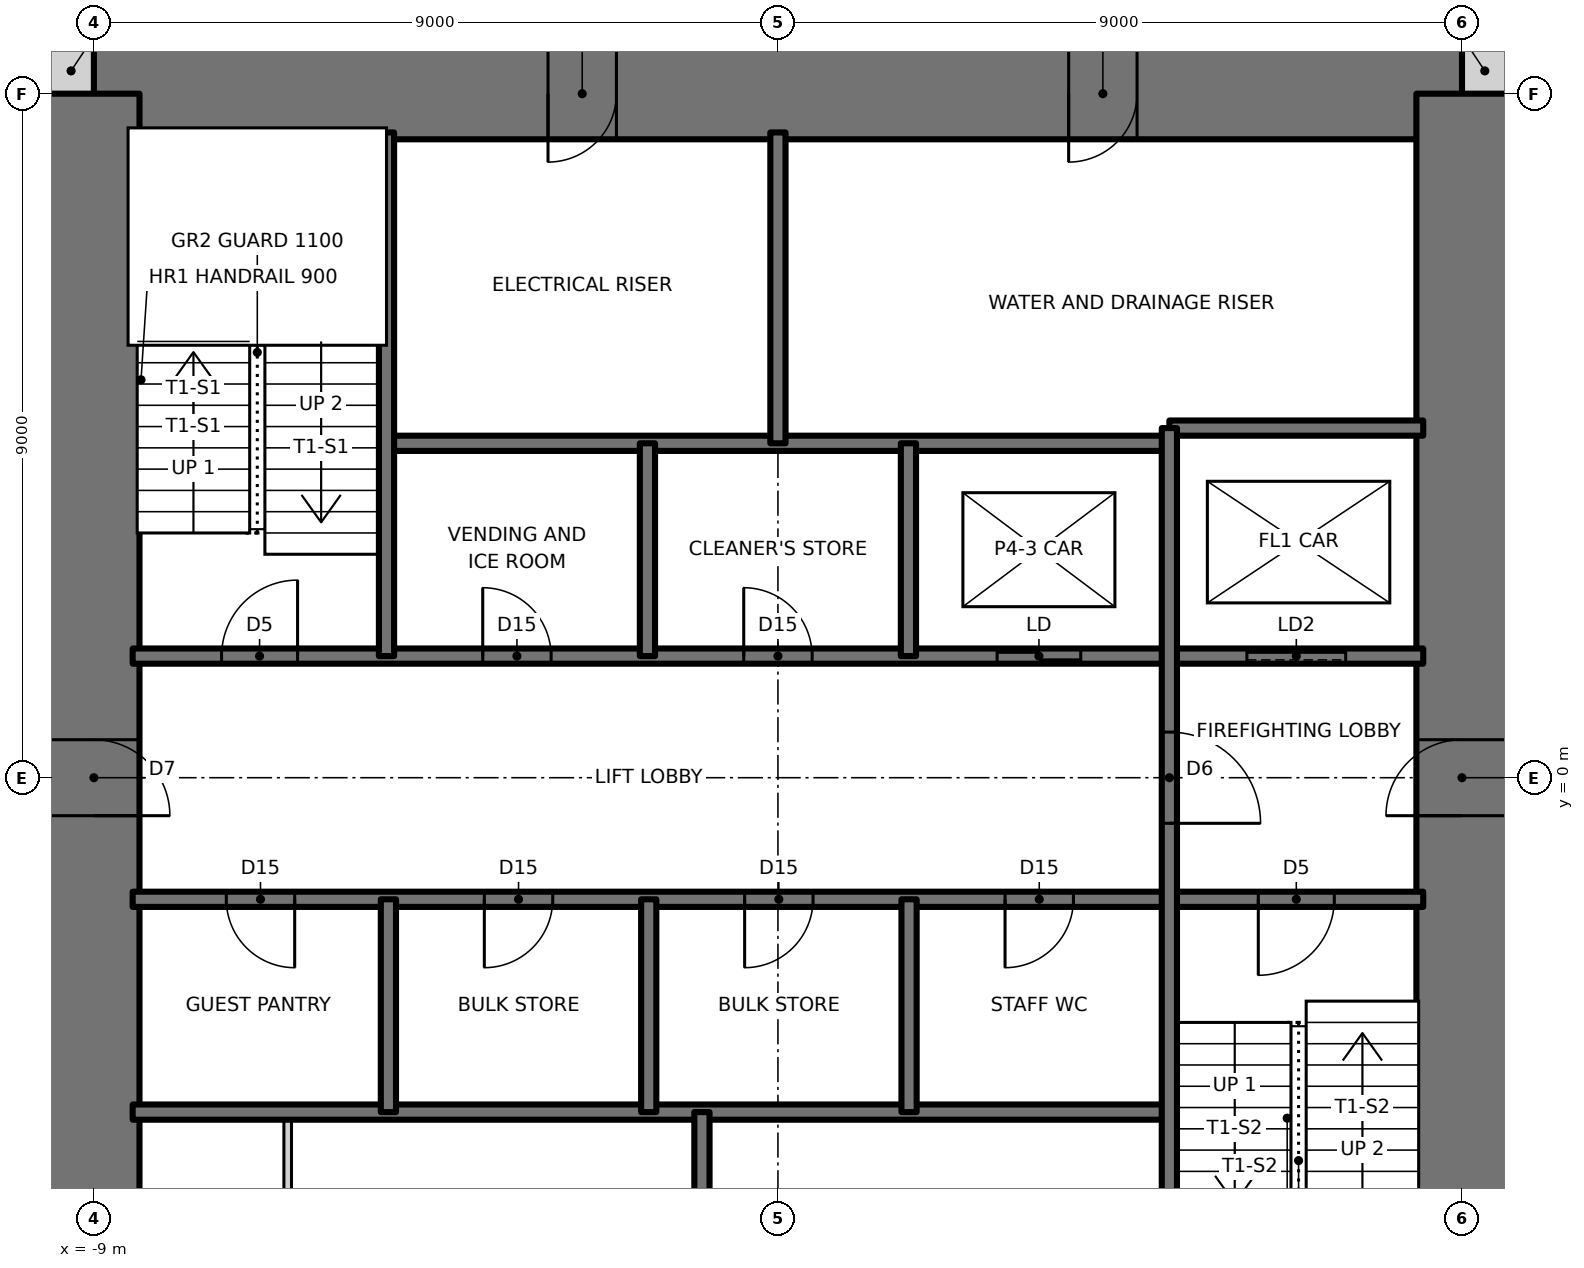
"""IFC4 building model, lengths in metres.
Left out: names, types, materials, properties, quantities, classifications, styles, units other than length and angle.
Written with IfcOpenShell. Run it as: python <this file> out.ifc"""

import sys

from ifc_helpers import new_model, si_unit, direction, frame, frame_2d, origin, place, context, subcontext, project, spatial, rectangle, extrude, element, fill, save


model = new_model("IFC4")
c1 = context("Model", 3, precision=1e-05, world=origin(), true_north=direction((0.0, 1.0)))
c2 = subcontext(c1, "Body", "Model", "MODEL_VIEW")
j1 = project(units=[si_unit("LENGTHUNIT", "METRE"), si_unit("PLANEANGLEUNIT", "RADIAN")], contexts=[c1])
p1 = place(None, origin())
s1 = spatial("IfcSite", under=j1, at=p1, CompositionType="ELEMENT")
p2 = place(p1, origin())
s2 = spatial("IfcBuilding", under=s1, at=p2, CompositionType="ELEMENT")
p3 = place(p2, frame((0.0, 0.0, 225.5)))
s3 = spatial("IfcBuildingStorey", under=s2, at=p3, CompositionType="ELEMENT", Elevation=225.5)
for number, where, z_axis, x_axis in (
    (1, (9.0, 9.3, 0.0), (0.0, 0.0, 1.0), (1.0, 0.0, 0.0)),
    (2, (-9.6, 9.3, 0.0), (0.0, 0.0, 1.0), (1.0, 0.0, 0.0)),
):
    element("IfcWall", number, at=place(p3, frame(where, z_axis=z_axis, x_axis=x_axis)), inside=s3, PredefinedType="SOLIDWALL", context=c2, shape_type="SweptSolid", body=[
        extrude(rectangle(XDim=0.6, YDim=0.6, at=frame_2d((0.3, 0.0))), origin(), (0.0, 0.0, 1.0), 3.5),
    ])
p4 = place(p3, frame((9.0, 9.0, 0.0), z_axis=(0.0, 0.0, 1.0), x_axis=(-1.0, 0.0, 0.0)))
e3 = element("IfcWall", 3, at=p4, inside=s3, PredefinedType="SHEAR", context=c2, shape_type="SweptSolid", body=[
    extrude(rectangle(XDim=18.0, YDim=1.2, at=frame_2d((9.0, 0.0))), origin(), (0.0, 0.0, 1.0), 3.5),
])
p5 = place(p4, frame((11.125, 0.0, 0.0)))
e4 = element("IfcOpeningElement", 4, at=p5, cuts=e3, PredefinedType="OPENING", context=c2, shape_type="SweptSolid", body=[
    extrude(rectangle(XDim=0.9, YDim=2.1, at=frame_2d((0.45, 1.05))), frame((0.0, 0.61, 0.0), z_axis=(0.0, -1.0, 0.0), x_axis=(1.0, 0.0, 0.0)), (0.0, 0.0, 1.0), 1.22),
])
p6 = place(p4, frame((4.275, 0.0, 0.0)))
e5 = element("IfcOpeningElement", 5, at=p6, cuts=e3, PredefinedType="OPENING", context=c2, shape_type="SweptSolid", body=[
    extrude(rectangle(XDim=0.9, YDim=2.1, at=frame_2d((0.45, 1.05))), frame((0.0, 0.61, 0.0), z_axis=(0.0, -1.0, 0.0), x_axis=(1.0, 0.0, 0.0)), (0.0, 0.0, 1.0), 1.22),
])
p7 = place(p3, frame((9.0, -9.0, 0.0), z_axis=(0.0, 0.0, 1.0), x_axis=(0.0, 1.0, 0.0)))
e6 = element("IfcWall", 6, at=p7, inside=s3, PredefinedType="SHEAR", context=c2, shape_type="SweptSolid", body=[
    extrude(rectangle(XDim=18.0, YDim=1.2, at=frame_2d((9.0, 0.0))), origin(), (0.0, 0.0, 1.0), 3.5),
])
p8 = place(p7, frame((8.5, 0.0, 0.0)))
e7 = element("IfcOpeningElement", 7, at=p8, cuts=e6, PredefinedType="OPENING", context=c2, shape_type="SweptSolid", body=[
    extrude(rectangle(XDim=1.0, YDim=2.1, at=frame_2d((0.5, 1.05))), frame((0.0, 0.61, 0.0), z_axis=(0.0, -1.0, 0.0), x_axis=(1.0, 0.0, 0.0)), (0.0, 0.0, 1.0), 1.22),
])
p9 = place(p3, frame((-9.0, 9.0, 0.0), z_axis=(0.0, 0.0, 1.0), x_axis=(0.0, -1.0, 0.0)))
e8 = element("IfcWall", 8, at=p9, inside=s3, PredefinedType="SHEAR", context=c2, shape_type="SweptSolid", body=[
    extrude(rectangle(XDim=18.0, YDim=1.2, at=frame_2d((9.0, 0.0))), origin(), (0.0, 0.0, 1.0), 3.5),
])
p10 = place(p9, frame((8.5, 0.0, 0.0)))
e9 = element("IfcOpeningElement", 9, at=p10, cuts=e8, PredefinedType="OPENING", context=c2, shape_type="SweptSolid", body=[
    extrude(rectangle(XDim=1.0, YDim=2.1, at=frame_2d((0.5, 1.05))), frame((0.0, 0.61, 0.0), z_axis=(0.0, -1.0, 0.0), x_axis=(1.0, 0.0, 0.0)), (0.0, 0.0, 1.0), 1.22),
])
p11 = place(p3, frame((-8.49, -4.4, 0.0), z_axis=(0.0, 0.0, 1.0), x_axis=(1.0, 0.0, 0.0)))
e10 = element("IfcWall", 10, at=p11, inside=s3, PredefinedType="SOLIDWALL", context=c2, shape_type="SweptSolid", body=[
    extrude(rectangle(XDim=13.64, YDim=0.2, at=frame_2d((6.82, 0.0))), origin(), (0.0, 0.0, 1.0), 3.5),
])
p12 = place(p3, frame((-8.49, -1.6, 0.0), z_axis=(0.0, 0.0, 1.0), x_axis=(1.0, 0.0, 0.0)))
e11 = element("IfcWall", 11, at=p12, inside=s3, PredefinedType="SOLIDWALL", context=c2, shape_type="SweptSolid", body=[
    extrude(rectangle(XDim=16.98, YDim=0.2, at=frame_2d((8.49, 0.0))), origin(), (0.0, 0.0, 1.0), 3.5),
])
p13 = place(p12, frame((14.81, 0.0, 0.0)))
e12 = element("IfcOpeningElement", 12, at=p13, cuts=e11, PredefinedType="OPENING", context=c2, shape_type="SweptSolid", body=[
    extrude(rectangle(XDim=1.0, YDim=2.1, at=frame_2d((0.5, 1.05))), frame((0.0, 0.11, 0.0), z_axis=(0.0, -1.0, 0.0), x_axis=(1.0, 0.0, 0.0)), (0.0, 0.0, 1.0), 0.22),
])
p14 = place(p12, frame((1.232, 0.0, 0.0)))
e13 = element("IfcOpeningElement", 13, at=p14, cuts=e11, PredefinedType="OPENING", context=c2, shape_type="SweptSolid", body=[
    extrude(rectangle(XDim=0.9, YDim=2.1, at=frame_2d((0.45, 1.05))), frame((0.0, 0.11, 0.0), z_axis=(0.0, -1.0, 0.0), x_axis=(1.0, 0.0, 0.0)), (0.0, 0.0, 1.0), 0.22),
])
p15 = place(p12, frame((4.627, 0.0, 0.0)))
e14 = element("IfcOpeningElement", 14, at=p15, cuts=e11, PredefinedType="OPENING", context=c2, shape_type="SweptSolid", body=[
    extrude(rectangle(XDim=0.9, YDim=2.1, at=frame_2d((0.45, 1.05))), frame((0.0, 0.11, 0.0), z_axis=(0.0, -1.0, 0.0), x_axis=(1.0, 0.0, 0.0)), (0.0, 0.0, 1.0), 0.22),
])
p16 = place(p12, frame((8.052, 0.0, 0.0)))
e15 = element("IfcOpeningElement", 15, at=p16, cuts=e11, PredefinedType="OPENING", context=c2, shape_type="SweptSolid", body=[
    extrude(rectangle(XDim=0.9, YDim=2.1, at=frame_2d((0.45, 1.05))), frame((0.0, 0.11, 0.0), z_axis=(0.0, -1.0, 0.0), x_axis=(1.0, 0.0, 0.0)), (0.0, 0.0, 1.0), 0.22),
])
p17 = place(p12, frame((11.478, 0.0, 0.0)))
e16 = element("IfcOpeningElement", 16, at=p17, cuts=e11, PredefinedType="OPENING", context=c2, shape_type="SweptSolid", body=[
    extrude(rectangle(XDim=0.9, YDim=2.1, at=frame_2d((0.45, 1.05))), frame((0.0, 0.11, 0.0), z_axis=(0.0, -1.0, 0.0), x_axis=(1.0, 0.0, 0.0)), (0.0, 0.0, 1.0), 0.22),
])
p18 = place(p3, frame((-8.49, 1.6, 0.0), z_axis=(0.0, 0.0, 1.0), x_axis=(1.0, 0.0, 0.0)))
e17 = element("IfcWall", 17, at=p18, inside=s3, PredefinedType="SOLIDWALL", context=c2, shape_type="SweptSolid", body=[
    extrude(rectangle(XDim=16.98, YDim=0.2, at=frame_2d((8.49, 0.0))), origin(), (0.0, 0.0, 1.0), 3.5),
])
p19 = place(p18, frame((1.17, 0.0, 0.0)))
e18 = element("IfcOpeningElement", 18, at=p19, cuts=e17, PredefinedType="OPENING", context=c2, shape_type="SweptSolid", body=[
    extrude(rectangle(XDim=1.0, YDim=2.1, at=frame_2d((0.5, 1.05))), frame((0.0, 0.11, 0.0), z_axis=(0.0, -1.0, 0.0), x_axis=(1.0, 0.0, 0.0)), (0.0, 0.0, 1.0), 0.22),
])
p20 = place(p18, frame((4.606, 0.0, 0.0)))
e19 = element("IfcOpeningElement", 19, at=p20, cuts=e17, PredefinedType="OPENING", context=c2, shape_type="SweptSolid", body=[
    extrude(rectangle(XDim=0.9, YDim=2.1, at=frame_2d((0.45, 1.05))), frame((0.0, 0.11, 0.0), z_axis=(0.0, -1.0, 0.0), x_axis=(1.0, 0.0, 0.0)), (0.0, 0.0, 1.0), 0.22),
])
p21 = place(p18, frame((8.04, 0.0, 0.0)))
e20 = element("IfcOpeningElement", 20, at=p21, cuts=e17, PredefinedType="OPENING", context=c2, shape_type="SweptSolid", body=[
    extrude(rectangle(XDim=0.9, YDim=2.1, at=frame_2d((0.45, 1.05))), frame((0.0, 0.11, 0.0), z_axis=(0.0, -1.0, 0.0), x_axis=(1.0, 0.0, 0.0)), (0.0, 0.0, 1.0), 0.22),
])
p22 = place(p18, frame((11.374, 0.0, 0.0)))
e21 = element("IfcOpeningElement", 21, at=p22, cuts=e17, PredefinedType="OPENING", context=c2, shape_type="SweptSolid", body=[
    extrude(rectangle(XDim=1.1, YDim=2.1, at=frame_2d((0.55, 1.05))), frame((0.0, 0.11, 0.0), z_axis=(0.0, -1.0, 0.0), x_axis=(1.0, 0.0, 0.0)), (0.0, 0.0, 1.0), 0.22),
])
p23 = place(p18, frame((14.66, 0.0, 0.0)))
e22 = element("IfcOpeningElement", 22, at=p23, cuts=e17, PredefinedType="OPENING", context=c2, shape_type="SweptSolid", body=[
    extrude(rectangle(XDim=1.3, YDim=2.1, at=frame_2d((0.65, 1.05))), frame((0.0, 0.11, 0.0), z_axis=(0.0, -1.0, 0.0), x_axis=(1.0, 0.0, 0.0)), (0.0, 0.0, 1.0), 0.22),
])
p24 = place(p3, frame((-5.15, 4.4, 0.0), z_axis=(0.0, 0.0, 1.0), x_axis=(1.0, 0.0, 0.0)))
e23 = element("IfcWall", 23, at=p24, inside=s3, PredefinedType="SOLIDWALL", context=c2, shape_type="SweptSolid", body=[
    extrude(rectangle(XDim=10.3, YDim=0.2, at=frame_2d((5.15, 0.0))), origin(), (0.0, 0.0, 1.0), 3.5),
])
p25 = place(p3, frame((5.15, 4.6, 0.0), z_axis=(0.0, 0.0, 1.0), x_axis=(1.0, 0.0, 0.0)))
e24 = element("IfcWall", 24, at=p25, inside=s3, PredefinedType="SOLIDWALL", context=c2, shape_type="SweptSolid", body=[
    extrude(rectangle(XDim=3.34, YDim=0.2, at=frame_2d((1.67, 0.0))), origin(), (0.0, 0.0, 1.0), 3.5),
])
p26 = place(p3, frame((5.15, -8.49, 0.0), z_axis=(0.0, 0.0, 1.0), x_axis=(0.0, 1.0, 0.0)))
e25 = element("IfcWall", 25, at=p26, inside=s3, PredefinedType="SOLIDWALL", context=c2, shape_type="SweptSolid", body=[
    extrude(rectangle(XDim=13.09, YDim=0.2, at=frame_2d((6.545, 0.0))), origin(), (0.0, 0.0, 1.0), 3.5),
])
p27 = place(p26, frame((7.89, 0.0, 0.0)))
e26 = element("IfcOpeningElement", 26, at=p27, cuts=e25, PredefinedType="OPENING", context=c2, shape_type="SweptSolid", body=[
    extrude(rectangle(XDim=1.2, YDim=2.1, at=frame_2d((0.6, 1.05))), frame((0.0, 0.11, 0.0), z_axis=(0.0, -1.0, 0.0), x_axis=(1.0, 0.0, 0.0)), (0.0, 0.0, 1.0), 0.22),
])
for number, where, z_axis, x_axis in (
    (27, (1.725, -4.4, 0.0), (0.0, 0.0, 1.0), (0.0, 1.0, 0.0)),
    (28, (1.717, 1.6, 0.0), (0.0, 0.0, 1.0), (0.0, 1.0, 0.0)),
):
    element("IfcWall", number, at=place(p3, frame(where, z_axis=z_axis, x_axis=x_axis)), inside=s3, PredefinedType="SOLIDWALL", context=c2, shape_type="SweptSolid", body=[
        extrude(rectangle(XDim=2.8, YDim=0.2, at=frame_2d((1.4, 0.0))), origin(), (0.0, 0.0, 1.0), 3.5),
    ])
for number, where, z_axis, x_axis in (
    (29, (0.0, 4.4, 0.0), (0.0, 0.0, 1.0), (0.0, 1.0, 0.0)),
    (30, (-1.0, -8.49, 0.0), (0.0, 0.0, 1.0), (0.0, 1.0, 0.0)),
):
    element("IfcWall", number, at=place(p3, frame(where, z_axis=z_axis, x_axis=x_axis)), inside=s3, PredefinedType="SOLIDWALL", context=c2, shape_type="SweptSolid", body=[
        extrude(rectangle(XDim=4.09, YDim=0.2, at=frame_2d((2.045, 0.0))), origin(), (0.0, 0.0, 1.0), 3.5),
    ])
for number, where, z_axis, x_axis in (
    (31, (-1.7, -4.4, 0.0), (0.0, 0.0, 1.0), (0.0, 1.0, 0.0)),
    (32, (-1.717, 1.6, 0.0), (0.0, 0.0, 1.0), (0.0, 1.0, 0.0)),
    (33, (-5.125, -4.4, 0.0), (0.0, 0.0, 1.0), (0.0, 1.0, 0.0)),
):
    element("IfcWall", number, at=place(p3, frame(where, z_axis=z_axis, x_axis=x_axis)), inside=s3, PredefinedType="SOLIDWALL", context=c2, shape_type="SweptSolid", body=[
        extrude(rectangle(XDim=2.8, YDim=0.2, at=frame_2d((1.4, 0.0))), origin(), (0.0, 0.0, 1.0), 3.5),
    ])
p28 = place(p3, frame((-5.15, 1.6, 0.0), z_axis=(0.0, 0.0, 1.0), x_axis=(0.0, 1.0, 0.0)))
e34 = element("IfcWall", 34, at=p28, inside=s3, PredefinedType="SOLIDWALL", context=c2, shape_type="SweptSolid", body=[
    extrude(rectangle(XDim=6.89, YDim=0.2, at=frame_2d((3.445, 0.0))), origin(), (0.0, 0.0, 1.0), 3.5),
])
p29 = place(p3, frame((-6.45, -8.49, 0.0), z_axis=(0.0, 0.0, 1.0), x_axis=(0.0, 1.0, 0.0)))
e35 = element("IfcWall", 35, at=p29, inside=s3, PredefinedType="PARTITIONING", context=c2, shape_type="SweptSolid", body=[
    extrude(rectangle(XDim=4.09, YDim=0.1, at=frame_2d((2.045, 0.0))), origin(), (0.0, 0.0, 1.0), 3.3),
])
p30 = place(p29, frame((1.595, 0.0, 0.0)))
e36 = element("IfcOpeningElement", 36, at=p30, cuts=e35, PredefinedType="OPENING", context=c2, shape_type="SweptSolid", body=[
    extrude(rectangle(XDim=0.9, YDim=2.1, at=frame_2d((0.45, 1.05))), frame((0.0, 0.06, 0.0), z_axis=(0.0, -1.0, 0.0), x_axis=(1.0, 0.0, 0.0)), (0.0, 0.0, 1.0), 0.12),
])
p31 = place(p19, origin())
e37 = element("IfcDoor", 37, at=p31, inside=s3, OperationType="SINGLE_SWING_RIGHT", PredefinedType="DOOR", context=c2, shape_type="SweptSolid", body=[
    extrude(rectangle(XDim=1.0, YDim=2.1, at=frame_2d((0.5, 1.05))), frame((0.0, 0.025, 0.0), z_axis=(0.0, -1.0, 0.0), x_axis=(1.0, 0.0, 0.0)), (0.0, 0.0, 1.0), 0.05),
])
fill(e18, e37)
p32 = place(p13, frame((1.0, 0.0, 0.0), z_axis=(0.0, 0.0, 1.0), x_axis=(-1.0, 0.0, 0.0)))
e38 = element("IfcDoor", 38, at=p32, inside=s3, OperationType="SINGLE_SWING_RIGHT", PredefinedType="DOOR", context=c2, shape_type="SweptSolid", body=[
    extrude(rectangle(XDim=1.0, YDim=2.1, at=frame_2d((0.5, 1.05))), frame((0.0, 0.025, 0.0), z_axis=(0.0, -1.0, 0.0), x_axis=(1.0, 0.0, 0.0)), (0.0, 0.0, 1.0), 0.05),
])
fill(e12, e38)
p33 = place(p27, frame((1.2, 0.0, 0.0), z_axis=(0.0, 0.0, 1.0), x_axis=(-1.0, 0.0, 0.0)))
e39 = element("IfcDoor", 39, at=p33, inside=s3, OperationType="SINGLE_SWING_RIGHT", PredefinedType="DOOR", context=c2, shape_type="SweptSolid", body=[
    extrude(rectangle(XDim=1.2, YDim=2.1, at=frame_2d((0.6, 1.05))), frame((0.0, 0.025, 0.0), z_axis=(0.0, -1.0, 0.0), x_axis=(1.0, 0.0, 0.0)), (0.0, 0.0, 1.0), 0.05),
])
fill(e26, e39)
p34 = place(p20, origin())
e40 = element("IfcDoor", 40, at=p34, inside=s3, OperationType="SINGLE_SWING_LEFT", PredefinedType="DOOR", context=c2, shape_type="SweptSolid", body=[
    extrude(rectangle(XDim=0.9, YDim=2.1, at=frame_2d((0.45, 1.05))), frame((0.0, 0.025, 0.0), z_axis=(0.0, -1.0, 0.0), x_axis=(1.0, 0.0, 0.0)), (0.0, 0.0, 1.0), 0.05),
])
fill(e19, e40)
p35 = place(p21, origin())
e41 = element("IfcDoor", 41, at=p35, inside=s3, OperationType="SINGLE_SWING_LEFT", PredefinedType="DOOR", context=c2, shape_type="SweptSolid", body=[
    extrude(rectangle(XDim=0.9, YDim=2.1, at=frame_2d((0.45, 1.05))), frame((0.0, 0.025, 0.0), z_axis=(0.0, -1.0, 0.0), x_axis=(1.0, 0.0, 0.0)), (0.0, 0.0, 1.0), 0.05),
])
fill(e20, e41)
p36 = place(p14, frame((0.9, 0.0, 0.0), z_axis=(0.0, 0.0, 1.0), x_axis=(-1.0, 0.0, 0.0)))
e42 = element("IfcDoor", 42, at=p36, inside=s3, OperationType="SINGLE_SWING_LEFT", PredefinedType="DOOR", context=c2, shape_type="SweptSolid", body=[
    extrude(rectangle(XDim=0.9, YDim=2.1, at=frame_2d((0.45, 1.05))), frame((0.0, 0.025, 0.0), z_axis=(0.0, -1.0, 0.0), x_axis=(1.0, 0.0, 0.0)), (0.0, 0.0, 1.0), 0.05),
])
fill(e13, e42)
p37 = place(p15, frame((0.9, 0.0, 0.0), z_axis=(0.0, 0.0, 1.0), x_axis=(-1.0, 0.0, 0.0)))
e43 = element("IfcDoor", 43, at=p37, inside=s3, OperationType="SINGLE_SWING_RIGHT", PredefinedType="DOOR", context=c2, shape_type="SweptSolid", body=[
    extrude(rectangle(XDim=0.9, YDim=2.1, at=frame_2d((0.45, 1.05))), frame((0.0, 0.025, 0.0), z_axis=(0.0, -1.0, 0.0), x_axis=(1.0, 0.0, 0.0)), (0.0, 0.0, 1.0), 0.05),
])
fill(e14, e43)
p38 = place(p16, frame((0.9, 0.0, 0.0), z_axis=(0.0, 0.0, 1.0), x_axis=(-1.0, 0.0, 0.0)))
e44 = element("IfcDoor", 44, at=p38, inside=s3, OperationType="SINGLE_SWING_RIGHT", PredefinedType="DOOR", context=c2, shape_type="SweptSolid", body=[
    extrude(rectangle(XDim=0.9, YDim=2.1, at=frame_2d((0.45, 1.05))), frame((0.0, 0.025, 0.0), z_axis=(0.0, -1.0, 0.0), x_axis=(1.0, 0.0, 0.0)), (0.0, 0.0, 1.0), 0.05),
])
fill(e15, e44)
p39 = place(p17, frame((0.9, 0.0, 0.0), z_axis=(0.0, 0.0, 1.0), x_axis=(-1.0, 0.0, 0.0)))
e45 = element("IfcDoor", 45, at=p39, inside=s3, OperationType="SINGLE_SWING_RIGHT", PredefinedType="DOOR", context=c2, shape_type="SweptSolid", body=[
    extrude(rectangle(XDim=0.9, YDim=2.1, at=frame_2d((0.45, 1.05))), frame((0.0, 0.025, 0.0), z_axis=(0.0, -1.0, 0.0), x_axis=(1.0, 0.0, 0.0)), (0.0, 0.0, 1.0), 0.05),
])
fill(e16, e45)
p40 = place(p10, origin())
e46 = element("IfcDoor", 46, at=p40, inside=s3, OperationType="SINGLE_SWING_RIGHT", PredefinedType="DOOR", context=c2, shape_type="SweptSolid", body=[
    extrude(rectangle(XDim=1.0, YDim=2.1, at=frame_2d((0.5, 1.05))), frame((0.0, 0.025, 0.0), z_axis=(0.0, -1.0, 0.0), x_axis=(1.0, 0.0, 0.0)), (0.0, 0.0, 1.0), 0.05),
])
fill(e9, e46)
p41 = place(p8, origin())
e47 = element("IfcDoor", 47, at=p41, inside=s3, OperationType="SINGLE_SWING_LEFT", PredefinedType="DOOR", context=c2, shape_type="SweptSolid", body=[
    extrude(rectangle(XDim=1.0, YDim=2.1, at=frame_2d((0.5, 1.05))), frame((0.0, 0.025, 0.0), z_axis=(0.0, -1.0, 0.0), x_axis=(1.0, 0.0, 0.0)), (0.0, 0.0, 1.0), 0.05),
])
fill(e7, e47)
p42 = place(p5, origin())
e48 = element("IfcDoor", 48, at=p42, inside=s3, OperationType="SINGLE_SWING_RIGHT", PredefinedType="DOOR", context=c2, shape_type="SweptSolid", body=[
    extrude(rectangle(XDim=0.9, YDim=2.1, at=frame_2d((0.45, 1.05))), frame((0.0, 0.025, 0.0), z_axis=(0.0, -1.0, 0.0), x_axis=(1.0, 0.0, 0.0)), (0.0, 0.0, 1.0), 0.05),
])
fill(e4, e48)
p43 = place(p6, origin())
e49 = element("IfcDoor", 49, at=p43, inside=s3, OperationType="SINGLE_SWING_RIGHT", PredefinedType="DOOR", context=c2, shape_type="SweptSolid", body=[
    extrude(rectangle(XDim=0.9, YDim=2.1, at=frame_2d((0.45, 1.05))), frame((0.0, 0.025, 0.0), z_axis=(0.0, -1.0, 0.0), x_axis=(1.0, 0.0, 0.0)), (0.0, 0.0, 1.0), 0.05),
])
fill(e5, e49)
p44 = place(p22, origin())
e50 = element("IfcDoor", 50, at=p44, inside=s3, OperationType="DOUBLE_DOOR_SLIDING", PredefinedType="DOOR", context=c2, shape_type="SweptSolid", body=[
    extrude(rectangle(XDim=1.1, YDim=2.1, at=frame_2d((0.55, 1.05))), frame((0.0, 0.025, 0.0), z_axis=(0.0, -1.0, 0.0), x_axis=(1.0, 0.0, 0.0)), (0.0, 0.0, 1.0), 0.05),
])
fill(e21, e50)
p45 = place(p23, origin())
e51 = element("IfcDoor", 51, at=p45, inside=s3, OperationType="SLIDING_TO_LEFT", PredefinedType="DOOR", context=c2, shape_type="SweptSolid", body=[
    extrude(rectangle(XDim=1.3, YDim=2.1, at=frame_2d((0.65, 1.05))), frame((0.0, 0.025, 0.0), z_axis=(0.0, -1.0, 0.0), x_axis=(1.0, 0.0, 0.0)), (0.0, 0.0, 1.0), 0.05),
])
fill(e22, e51)
save(model, sys.argv[1])
